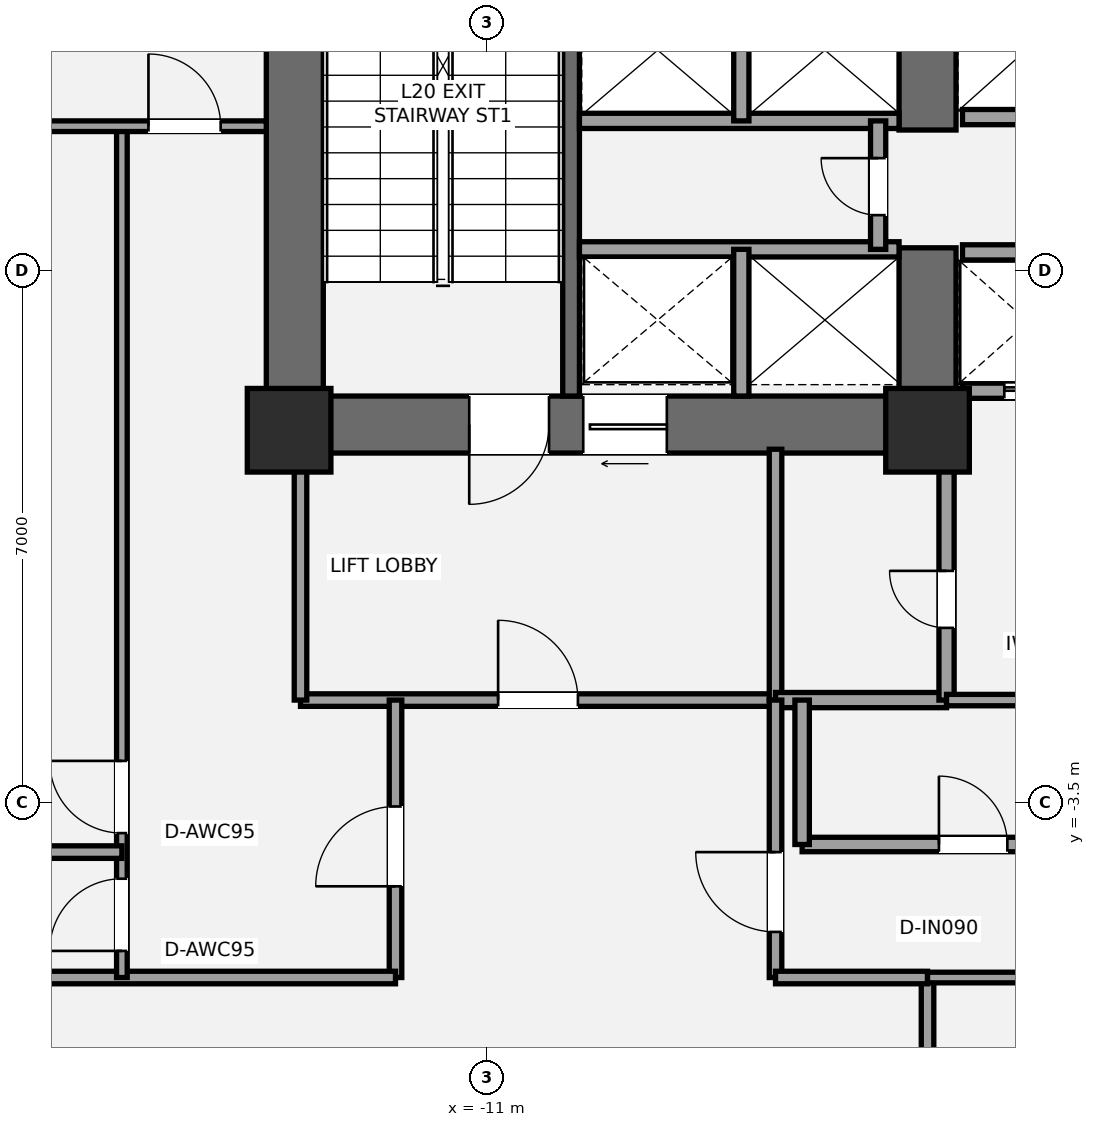
"""IFC4 building model, lengths in metres.
Left out: names, types, materials, properties, quantities, classifications, styles, units other than length and angle.
Written with IfcOpenShell. Run it as: python <this file> out.ifc"""

import sys

from ifc_helpers import new_model, si_unit, direction, frame, frame_2d, origin, origin_2d, place, context, subcontext, project, spatial, rectangle, extrude, element, fill, save


model = new_model("IFC4")
c1 = context("Model", 3, precision=1e-05, world=origin(), true_north=direction((0.0, 1.0)))
c2 = subcontext(c1, "Body", "Model", "MODEL_VIEW")
j1 = project(units=[si_unit("LENGTHUNIT", "METRE"), si_unit("PLANEANGLEUNIT", "RADIAN")], contexts=[c1])
p1 = place(None, origin())
s1 = spatial("IfcSite", under=j1, at=p1, CompositionType="ELEMENT")
p2 = place(p1, origin())
s2 = spatial("IfcBuilding", under=s1, at=p2, CompositionType="ELEMENT")
p3 = place(p2, frame((0.0, 0.0, 77.4)))
s3 = spatial("IfcBuildingStorey", under=s2, at=p3, CompositionType="ELEMENT", Elevation=77.4)
p4 = place(p3, frame((-13.525, 1.1, 0.0), z_axis=(0.0, 0.0, 1.0), x_axis=(0.0, 1.0, 0.0)))
e1 = element("IfcWall", 1, at=p4, inside=s3, PredefinedType="SHEAR", context=c2, shape_type="SweptSolid", body=[
    extrude(rectangle(XDim=8.65, YDim=0.75, at=frame_2d((4.325, 0.0))), origin(), (0.0, 0.0, 1.0), 4.5),
])
p5 = place(p3, frame((-4.825, 1.475, 0.0), z_axis=(0.0, 0.0, 1.0), x_axis=(-1.0, 0.0, 0.0)))
e2 = element("IfcWall", 2, at=p5, inside=s3, PredefinedType="SHEAR", context=c2, shape_type="SweptSolid", body=[
    extrude(rectangle(XDim=9.075, YDim=0.75, at=frame_2d((4.538, 0.0))), origin(), (0.0, 0.0, 1.0), 4.5),
])
p6 = place(p5, frame((5.355, 0.0, 0.0)))
e3 = element("IfcOpeningElement", 3, at=p6, cuts=e2, PredefinedType="OPENING", context=c2, shape_type="SweptSolid", body=[
    extrude(rectangle(XDim=1.05, YDim=2.15, at=frame_2d((0.525, 1.075))), frame((0.0, 0.385, 0.0), z_axis=(0.0, -1.0, 0.0), x_axis=(1.0, 0.0, 0.0)), (0.0, 0.0, 1.0), 0.77),
])
p7 = place(p5, frame((3.805, 0.0, 0.0)))
e4 = element("IfcOpeningElement", 4, at=p7, cuts=e2, PredefinedType="OPENING", context=c2, shape_type="SweptSolid", body=[
    extrude(rectangle(XDim=1.1, YDim=2.2, at=frame_2d((0.55, 1.1))), frame((0.0, 0.385, 0.0), z_axis=(0.0, -1.0, 0.0), x_axis=(1.0, 0.0, 0.0)), (0.0, 0.0, 1.0), 0.77),
])
p8 = place(p3, frame((-5.2, 1.1, 0.0), z_axis=(0.0, 0.0, 1.0), x_axis=(0.0, 1.0, 0.0)))
e5 = element("IfcWall", 5, at=p8, inside=s3, PredefinedType="SHEAR", context=c2, shape_type="SweptSolid", body=[
    extrude(rectangle(XDim=2.7, YDim=0.75, at=frame_2d((1.35, 0.0))), origin(), (0.0, 0.0, 1.0), 4.5),
])
p9 = place(p3, frame((-5.2, 5.35, 0.0), z_axis=(0.0, 0.0, 1.0), x_axis=(0.0, 1.0, 0.0)))
e6 = element("IfcWall", 6, at=p9, inside=s3, PredefinedType="SHEAR", context=c2, shape_type="SweptSolid", body=[
    extrude(rectangle(XDim=2.0, YDim=0.75, at=frame_2d((1.0, 0.0))), origin(), (0.0, 0.0, 1.0), 4.5),
])
p10 = place(p3, frame((-9.89, 1.85, 0.0), z_axis=(0.0, 0.0, 1.0), x_axis=(0.0, 1.0, 0.0)))
e7 = element("IfcWall", 7, at=p10, inside=s3, PredefinedType="SHEAR", context=c2, shape_type="SweptSolid", body=[
    extrude(rectangle(XDim=7.15, YDim=0.22, at=frame_2d((3.575, 0.0))), origin(), (0.0, 0.0, 1.0), 4.5),
])
for number, where, z_axis, x_axis in (
    (8, (-13.6, 1.4, 0.0), (0.0, 0.0, 1.0), (1.0, 0.0, 0.0)),
    (9, (-5.2, 1.4, 0.0), (0.0, 0.0, 1.0), (1.0, 0.0, 0.0)),
):
    element("IfcColumn", number, at=place(p3, frame(where, z_axis=z_axis, x_axis=x_axis)), inside=s3, PredefinedType="COLUMN", context=c2, shape_type="SweptSolid", body=[
        extrude(rectangle(XDim=1.1, YDim=1.1, at=origin_2d()), origin(), (0.0, 0.0, 1.0), 4.5),
    ])
p11 = place(p3, frame((-13.45, -2.15, 0.0), z_axis=(0.0, 0.0, 1.0), x_axis=(1.0, 0.0, 0.0)))
e10 = element("IfcWall", 10, at=p11, inside=s3, PredefinedType="PARTITIONING", context=c2, shape_type="SweptSolid", body=[
    extrude(rectangle(XDim=6.25, YDim=0.165, at=frame_2d((3.125, 0.0))), origin(), (0.0, 0.0, 1.0), 3.733),
])
p12 = place(p11, frame((2.6, 0.0, 0.0)))
e11 = element("IfcOpeningElement", 11, at=p12, cuts=e10, PredefinedType="OPENING", context=c2, shape_type="SweptSolid", body=[
    extrude(rectangle(XDim=1.05, YDim=2.15, at=frame_2d((0.525, 1.075))), frame((0.0, 0.093, 0.0), z_axis=(0.0, -1.0, 0.0), x_axis=(1.0, 0.0, 0.0)), (0.0, 0.0, 1.0), 0.185),
])
p13 = place(p3, frame((-13.45, -2.15, 0.0), z_axis=(0.0, 0.0, 1.0), x_axis=(0.0, 1.0, 0.0)))
e12 = element("IfcWall", 12, at=p13, inside=s3, PredefinedType="PARTITIONING", context=c2, shape_type="SweptSolid", body=[
    extrude(rectangle(XDim=3.3, YDim=0.165, at=frame_2d((1.65, 0.0))), origin(), (0.0, 0.0, 1.0), 2.47),
])
p14 = place(p3, frame((-7.2, -2.15, 0.0), z_axis=(0.0, 0.0, 1.0), x_axis=(0.0, 1.0, 0.0)))
e13 = element("IfcWall", 13, at=p14, inside=s3, PredefinedType="PARTITIONING", context=c2, shape_type="SweptSolid", body=[
    extrude(rectangle(XDim=3.3, YDim=0.165, at=frame_2d((1.65, 0.0))), origin(), (0.0, 0.0, 1.0), 3.733),
])
p15 = place(p3, frame((-7.2, -2.15, 0.0), z_axis=(0.0, 0.0, 1.0), x_axis=(1.0, 0.0, 0.0)))
e14 = element("IfcWall", 14, at=p15, inside=s3, PredefinedType="SOLIDWALL", context=c2, shape_type="SweptSolid", body=[
    extrude(rectangle(XDim=2.25, YDim=0.2, at=frame_2d((1.125, 0.0))), origin(), (0.0, 0.0, 1.0), 2.47),
])
p16 = place(p3, frame((-4.95, -2.15, 0.0), z_axis=(0.0, 0.0, 1.0), x_axis=(0.0, 1.0, 0.0)))
e15 = element("IfcWall", 15, at=p16, inside=s3, PredefinedType="SOLIDWALL", context=c2, shape_type="SweptSolid", body=[
    extrude(rectangle(XDim=3.3, YDim=0.2, at=frame_2d((1.65, 0.0))), origin(), (0.0, 0.0, 1.0), 2.47),
])
p17 = place(p16, frame((0.95, 0.0, 0.0)))
e16 = element("IfcOpeningElement", 16, at=p17, cuts=e15, PredefinedType="OPENING", context=c2, shape_type="SweptSolid", body=[
    extrude(rectangle(XDim=0.75, YDim=2.1, at=frame_2d((0.375, 1.05))), frame((0.0, 0.11, 0.0), z_axis=(0.0, -1.0, 0.0), x_axis=(1.0, 0.0, 0.0)), (0.0, 0.0, 1.0), 0.22),
])
p18 = place(p3, frame((-9.78, 3.78, 0.0), z_axis=(0.0, 0.0, 1.0), x_axis=(1.0, 0.0, 0.0)))
e17 = element("IfcWall", 17, at=p18, inside=s3, PredefinedType="SOLIDWALL", context=c2, shape_type="SweptSolid", body=[
    extrude(rectangle(XDim=4.205, YDim=0.2, at=frame_2d((2.103, 0.0))), origin(), (0.0, 0.0, 1.0), 4.28),
])
p19 = place(p3, frame((-7.65, 1.85, 0.0), z_axis=(0.0, 0.0, 1.0), x_axis=(0.0, 1.0, 0.0)))
e18 = element("IfcWall", 18, at=p19, inside=s3, PredefinedType="SOLIDWALL", context=c2, shape_type="SweptSolid", body=[
    extrude(rectangle(XDim=1.93, YDim=0.2, at=frame_2d((0.965, 0.0))), origin(), (0.0, 0.0, 1.0), 4.28),
])
p20 = place(p3, frame((-9.78, 5.47, 0.0), z_axis=(0.0, 0.0, 1.0), x_axis=(1.0, 0.0, 0.0)))
e19 = element("IfcWall", 19, at=p20, inside=s3, PredefinedType="SOLIDWALL", context=c2, shape_type="SweptSolid", body=[
    extrude(rectangle(XDim=4.205, YDim=0.2, at=frame_2d((2.103, 0.0))), origin(), (0.0, 0.0, 1.0), 4.28),
])
p21 = place(p3, frame((-7.65, 5.47, 0.0), z_axis=(0.0, 0.0, 1.0), x_axis=(0.0, 1.0, 0.0)))
e20 = element("IfcWall", 20, at=p21, inside=s3, PredefinedType="SOLIDWALL", context=c2, shape_type="SweptSolid", body=[
    extrude(rectangle(XDim=1.86, YDim=0.2, at=frame_2d((0.93, 0.0))), origin(), (0.0, 0.0, 1.0), 4.28),
])
p22 = place(p3, frame((-5.85, 3.78, 0.0), z_axis=(0.0, 0.0, 1.0), x_axis=(0.0, 1.0, 0.0)))
e21 = element("IfcWall", 21, at=p22, inside=s3, PredefinedType="SOLIDWALL", context=c2, shape_type="SweptSolid", body=[
    extrude(rectangle(XDim=1.69, YDim=0.2, at=frame_2d((0.845, 0.0))), origin(), (0.0, 0.0, 1.0), 4.28),
])
p23 = place(p22, frame((0.45, 0.0, 0.0)))
e22 = element("IfcOpeningElement", 22, at=p23, cuts=e21, PredefinedType="OPENING", context=c2, shape_type="SweptSolid", body=[
    extrude(rectangle(XDim=0.75, YDim=2.1, at=frame_2d((0.375, 1.05))), frame((0.0, 0.11, 0.0), z_axis=(0.0, -1.0, 0.0), x_axis=(1.0, 0.0, 0.0)), (0.0, 0.0, 1.0), 0.22),
])
p24 = place(p3, frame((-4.74, 1.92, 0.0), z_axis=(0.0, 0.0, 1.0), x_axis=(1.0, 0.0, 0.0)))
e23 = element("IfcWall", 23, at=p24, inside=s3, PredefinedType="SOLIDWALL", context=c2, shape_type="SweptSolid", body=[
    extrude(rectangle(XDim=3.86, YDim=0.2, at=frame_2d((1.93, 0.0))), origin(), (0.0, 0.0, 1.0), 3.27),
])
p25 = place(p24, frame((0.55, 0.0, 0.0)))
e24 = element("IfcOpeningElement", 24, at=p25, cuts=e23, PredefinedType="OPENING", context=c2, shape_type="SweptSolid", body=[
    extrude(rectangle(XDim=1.1, YDim=2.2, at=frame_2d((0.55, 1.1))), frame((0.0, 0.11, 0.0), z_axis=(0.0, -1.0, 0.0), x_axis=(1.0, 0.0, 0.0)), (0.0, 0.0, 1.0), 0.22),
])
p26 = place(p24, frame((2.55, 0.0, 0.0)))
e25 = element("IfcOpeningElement", 25, at=p26, cuts=e23, PredefinedType="OPENING", context=c2, shape_type="SweptSolid", body=[
    extrude(rectangle(XDim=1.1, YDim=2.2, at=frame_2d((0.55, 1.1))), frame((0.0, 0.11, 0.0), z_axis=(0.0, -1.0, 0.0), x_axis=(1.0, 0.0, 0.0)), (0.0, 0.0, 1.0), 0.22),
])
for number, where, z_axis, x_axis in (
    (26, (-4.74, 3.74, 0.0), (0.0, 0.0, 1.0), (1.0, 0.0, 0.0)),
    (27, (-4.74, 5.52, 0.0), (0.0, 0.0, 1.0), (1.0, 0.0, 0.0)),
):
    element("IfcWall", number, at=place(p3, frame(where, z_axis=z_axis, x_axis=x_axis)), inside=s3, PredefinedType="SOLIDWALL", context=c2, shape_type="SweptSolid", body=[
        extrude(rectangle(XDim=3.86, YDim=0.2, at=frame_2d((1.93, 0.0))), origin(), (0.0, 0.0, 1.0), 4.28),
    ])
p27 = place(p3, frame((-6.85, -4.05, 0.0), z_axis=(0.0, 0.0, 1.0), x_axis=(1.0, 0.0, 0.0)))
e28 = element("IfcWall", 28, at=p27, inside=s3, PredefinedType="PLUMBINGWALL", context=c2, shape_type="SweptSolid", body=[
    extrude(rectangle(XDim=4.75, YDim=0.19, at=frame_2d((2.375, 0.0))), origin(), (0.0, 0.0, 1.0), 2.47),
])
p28 = place(p27, frame((1.8, 0.0, 0.0)))
e29 = element("IfcOpeningElement", 29, at=p28, cuts=e28, PredefinedType="OPENING", context=c2, shape_type="SweptSolid", body=[
    extrude(rectangle(XDim=0.9, YDim=2.1, at=frame_2d((0.45, 1.05))), frame((0.0, 0.105, 0.0), z_axis=(0.0, -1.0, 0.0), x_axis=(1.0, 0.0, 0.0)), (0.0, 0.0, 1.0), 0.21),
])
p29 = place(p3, frame((-4.95, -2.15, 0.0), z_axis=(0.0, 0.0, 1.0), x_axis=(1.0, 0.0, 0.0)))
e30 = element("IfcWall", 30, at=p29, inside=s3, PredefinedType="PLUMBINGWALL", context=c2, shape_type="SweptSolid", body=[
    extrude(rectangle(XDim=2.85, YDim=0.15, at=frame_2d((1.425, 0.0))), origin(), (0.0, 0.0, 1.0), 4.28),
])
p30 = place(p3, frame((-6.85, -4.05, 0.0), z_axis=(0.0, 0.0, 1.0), x_axis=(0.0, 1.0, 0.0)))
e31 = element("IfcWall", 31, at=p30, inside=s3, PredefinedType="PLUMBINGWALL", context=c2, shape_type="SweptSolid", body=[
    extrude(rectangle(XDim=1.9, YDim=0.19, at=frame_2d((0.95, 0.0))), origin(), (0.0, 0.0, 1.0), 4.28),
])
p31 = place(p3, frame((-12.2, -5.8, 0.0), z_axis=(0.0, 0.0, 1.0), x_axis=(0.0, 1.0, 0.0)))
e32 = element("IfcWall", 32, at=p31, inside=s3, PredefinedType="PARTITIONING", context=c2, shape_type="SweptSolid", body=[
    extrude(rectangle(XDim=3.65, YDim=0.165, at=frame_2d((1.825, 0.0))), origin(), (0.0, 0.0, 1.0), 4.28),
])
p32 = place(p31, frame((1.2, 0.0, 0.0)))
e33 = element("IfcOpeningElement", 33, at=p32, cuts=e32, PredefinedType="OPENING", context=c2, shape_type="SweptSolid", body=[
    extrude(rectangle(XDim=1.05, YDim=2.15, at=frame_2d((0.525, 1.075))), frame((0.0, 0.093, 0.0), z_axis=(0.0, -1.0, 0.0), x_axis=(1.0, 0.0, 0.0)), (0.0, 0.0, 1.0), 0.185),
])
p33 = place(p3, frame((-7.2, -5.8, 0.0), z_axis=(0.0, 0.0, 1.0), x_axis=(0.0, 1.0, 0.0)))
e34 = element("IfcWall", 34, at=p33, inside=s3, PredefinedType="PARTITIONING", context=c2, shape_type="SweptSolid", body=[
    extrude(rectangle(XDim=3.65, YDim=0.165, at=frame_2d((1.825, 0.0))), origin(), (0.0, 0.0, 1.0), 4.28),
])
p34 = place(p33, frame((0.6, 0.0, 0.0)))
e35 = element("IfcOpeningElement", 35, at=p34, cuts=e34, PredefinedType="OPENING", context=c2, shape_type="SweptSolid", body=[
    extrude(rectangle(XDim=1.05, YDim=2.15, at=frame_2d((0.525, 1.075))), frame((0.0, 0.093, 0.0), z_axis=(0.0, -1.0, 0.0), x_axis=(1.0, 0.0, 0.0)), (0.0, 0.0, 1.0), 0.185),
])
p35 = place(p3, frame((-5.2, -18.634, 0.0), z_axis=(0.0, 0.0, 1.0), x_axis=(0.0, 1.0, 0.0)))
e36 = element("IfcWall", 36, at=p35, inside=s3, PredefinedType="PARTITIONING", context=c2, shape_type="SweptSolid", body=[
    extrude(rectangle(XDim=12.834, YDim=0.165, at=frame_2d((6.417, 0.0))), origin(), (0.0, 0.0, 1.0), 4.28),
])
p36 = place(p3, frame((-26.949, -5.8, 0.0), z_axis=(0.0, 0.0, 1.0), x_axis=(1.0, 0.0, 0.0)))
e37 = element("IfcWall", 37, at=p36, inside=s3, PredefinedType="PARTITIONING", context=c2, shape_type="SweptSolid", body=[
    extrude(rectangle(XDim=14.75, YDim=0.165, at=frame_2d((7.375, 0.0))), origin(), (0.0, 0.0, 1.0), 2.47),
])
p37 = place(p3, frame((-7.2, -5.8, 0.0), z_axis=(0.0, 0.0, 1.0), x_axis=(1.0, 0.0, 0.0)))
e38 = element("IfcWall", 38, at=p37, inside=s3, PredefinedType="PARTITIONING", context=c2, shape_type="SweptSolid", body=[
    extrude(rectangle(XDim=2.0, YDim=0.165, at=frame_2d((1.0, 0.0))), origin(), (0.0, 0.0, 1.0), 2.47),
])
p38 = place(p3, frame((-5.2, -5.8, 0.0), z_axis=(0.0, 0.0, 1.0), x_axis=(1.0, 0.0, 0.0)))
e39 = element("IfcWall", 39, at=p38, inside=s3, PredefinedType="PARTITIONING", context=c2, shape_type="SweptSolid", body=[
    extrude(rectangle(XDim=10.4, YDim=0.14, at=frame_2d((5.2, 0.0))), origin(), (0.0, 0.0, 1.0), 4.28),
])
p39 = place(p38, frame((1.8, 0.0, 0.0)))
e40 = element("IfcOpeningElement", 40, at=p39, cuts=e39, PredefinedType="OPENING", context=c2, shape_type="SweptSolid", body=[
    extrude(rectangle(XDim=0.95, YDim=2.15, at=frame_2d((0.475, 1.075))), frame((0.0, 0.08, 0.0), z_axis=(0.0, -1.0, 0.0), x_axis=(1.0, 0.0, 0.0)), (0.0, 0.0, 1.0), 0.16),
])
p40 = place(p38, frame((7.0, 0.0, 0.0)))
e41 = element("IfcOpeningElement", 41, at=p40, cuts=e39, PredefinedType="OPENING", context=c2, shape_type="SweptSolid", body=[
    extrude(rectangle(XDim=0.95, YDim=2.15, at=frame_2d((0.475, 1.075))), frame((0.0, 0.08, 0.0), z_axis=(0.0, -1.0, 0.0), x_axis=(1.0, 0.0, 0.0)), (0.0, 0.0, 1.0), 0.16),
])
p41 = place(p3, frame((-15.8, -5.8, 0.0), z_axis=(0.0, 0.0, 1.0), x_axis=(0.0, 1.0, 0.0)))
e42 = element("IfcWall", 42, at=p41, inside=s3, PredefinedType="PARTITIONING", context=c2, shape_type="SweptSolid", body=[
    extrude(rectangle(XDim=11.2, YDim=0.14, at=frame_2d((5.6, 0.0))), origin(), (0.0, 0.0, 1.0), 2.47),
])
p42 = place(p41, frame((0.35, 0.0, 0.0)))
e43 = element("IfcOpeningElement", 43, at=p42, cuts=e42, PredefinedType="OPENING", context=c2, shape_type="SweptSolid", body=[
    extrude(rectangle(XDim=0.95, YDim=2.15, at=frame_2d((0.475, 1.075))), frame((0.0, 0.08, 0.0), z_axis=(0.0, -1.0, 0.0), x_axis=(1.0, 0.0, 0.0)), (0.0, 0.0, 1.0), 0.16),
])
p43 = place(p41, frame((1.9, 0.0, 0.0)))
e44 = element("IfcOpeningElement", 44, at=p43, cuts=e42, PredefinedType="OPENING", context=c2, shape_type="SweptSolid", body=[
    extrude(rectangle(XDim=0.95, YDim=2.15, at=frame_2d((0.475, 1.075))), frame((0.0, 0.08, 0.0), z_axis=(0.0, -1.0, 0.0), x_axis=(1.0, 0.0, 0.0)), (0.0, 0.0, 1.0), 0.16),
])
p44 = place(p3, frame((-27.169, 5.4, 0.0), z_axis=(0.0, 0.0, 1.0), x_axis=(1.0, 0.0, 0.0)))
e45 = element("IfcWall", 45, at=p44, inside=s3, PredefinedType="PARTITIONING", context=c2, shape_type="SweptSolid", body=[
    extrude(rectangle(XDim=13.27, YDim=0.14, at=frame_2d((6.635, 0.0))), origin(), (0.0, 0.0, 1.0), 4.28),
])
p45 = place(p44, frame((11.719, 0.0, 0.0)))
e46 = element("IfcOpeningElement", 46, at=p45, cuts=e45, PredefinedType="OPENING", context=c2, shape_type="SweptSolid", body=[
    extrude(rectangle(XDim=0.95, YDim=2.15, at=frame_2d((0.475, 1.075))), frame((0.0, 0.08, 0.0), z_axis=(0.0, -1.0, 0.0), x_axis=(1.0, 0.0, 0.0)), (0.0, 0.0, 1.0), 0.16),
])
p46 = place(p3, frame((-27.537, -4.15, 0.0), z_axis=(0.0, 0.0, 1.0), x_axis=(1.0, 0.0, 0.0)))
e47 = element("IfcWall", 47, at=p46, inside=s3, PredefinedType="PARTITIONING", context=c2, shape_type="SweptSolid", body=[
    extrude(rectangle(XDim=11.737, YDim=0.165, at=frame_2d((5.868, 0.0))), origin(), (0.0, 0.0, 1.0), 2.47),
])
p47 = place(p6, origin())
e48 = element("IfcDoor", 48, at=p47, inside=s3, OperationType="SINGLE_SWING_RIGHT", PredefinedType="DOOR", context=c2, shape_type="SweptSolid", body=[
    extrude(rectangle(XDim=1.05, YDim=2.15, at=frame_2d((0.525, 1.075))), frame((0.0, 0.025, 0.0), z_axis=(0.0, -1.0, 0.0), x_axis=(1.0, 0.0, 0.0)), (0.0, 0.0, 1.0), 0.05),
])
fill(e3, e48)
p48 = place(p17, origin())
e49 = element("IfcDoor", 49, at=p48, inside=s3, OperationType="SINGLE_SWING_RIGHT", PredefinedType="DOOR", context=c2, shape_type="SweptSolid", body=[
    extrude(rectangle(XDim=0.75, YDim=2.1, at=frame_2d((0.375, 1.05))), frame((0.0, 0.025, 0.0), z_axis=(0.0, -1.0, 0.0), x_axis=(1.0, 0.0, 0.0)), (0.0, 0.0, 1.0), 0.05),
])
fill(e16, e49)
p49 = place(p7, origin())
e50 = element("IfcDoor", 50, at=p49, inside=s3, OperationType="SLIDING_TO_LEFT", PredefinedType="DOOR", context=c2, shape_type="SweptSolid", body=[
    extrude(rectangle(XDim=1.1, YDim=2.2, at=frame_2d((0.55, 1.1))), frame((0.0, 0.025, 0.0), z_axis=(0.0, -1.0, 0.0), x_axis=(1.0, 0.0, 0.0)), (0.0, 0.0, 1.0), 0.05),
])
fill(e4, e50)
p50 = place(p23, origin())
e51 = element("IfcDoor", 51, at=p50, inside=s3, OperationType="SINGLE_SWING_RIGHT", PredefinedType="DOOR", context=c2, shape_type="SweptSolid", body=[
    extrude(rectangle(XDim=0.75, YDim=2.1, at=frame_2d((0.375, 1.05))), frame((0.0, 0.025, 0.0), z_axis=(0.0, -1.0, 0.0), x_axis=(1.0, 0.0, 0.0)), (0.0, 0.0, 1.0), 0.05),
])
fill(e22, e51)
p51 = place(p25, origin())
e52 = element("IfcDoor", 52, at=p51, inside=s3, OperationType="SLIDING_TO_LEFT", PredefinedType="DOOR", context=c2, shape_type="SweptSolid", body=[
    extrude(rectangle(XDim=1.1, YDim=2.2, at=frame_2d((0.55, 1.1))), frame((0.0, 0.025, 0.0), z_axis=(0.0, -1.0, 0.0), x_axis=(1.0, 0.0, 0.0)), (0.0, 0.0, 1.0), 0.05),
])
fill(e24, e52)
p52 = place(p28, origin())
e53 = element("IfcDoor", 53, at=p52, inside=s3, OperationType="SINGLE_SWING_LEFT", PredefinedType="DOOR", context=c2, shape_type="SweptSolid", body=[
    extrude(rectangle(XDim=0.9, YDim=2.1, at=frame_2d((0.45, 1.05))), frame((0.0, 0.025, 0.0), z_axis=(0.0, -1.0, 0.0), x_axis=(1.0, 0.0, 0.0)), (0.0, 0.0, 1.0), 0.05),
])
fill(e29, e53)
p53 = place(p12, origin())
e54 = element("IfcDoor", 54, at=p53, inside=s3, OperationType="SINGLE_SWING_LEFT", PredefinedType="DOOR", context=c2, shape_type="SweptSolid", body=[
    extrude(rectangle(XDim=1.05, YDim=2.15, at=frame_2d((0.525, 1.075))), frame((0.0, 0.025, 0.0), z_axis=(0.0, -1.0, 0.0), x_axis=(1.0, 0.0, 0.0)), (0.0, 0.0, 1.0), 0.05),
])
fill(e11, e54)
p54 = place(p32, origin())
e55 = element("IfcDoor", 55, at=p54, inside=s3, OperationType="SINGLE_SWING_LEFT", PredefinedType="DOOR", context=c2, shape_type="SweptSolid", body=[
    extrude(rectangle(XDim=1.05, YDim=2.15, at=frame_2d((0.525, 1.075))), frame((0.0, 0.025, 0.0), z_axis=(0.0, -1.0, 0.0), x_axis=(1.0, 0.0, 0.0)), (0.0, 0.0, 1.0), 0.05),
])
fill(e33, e55)
p55 = place(p34, origin())
e56 = element("IfcDoor", 56, at=p55, inside=s3, OperationType="SINGLE_SWING_RIGHT", PredefinedType="DOOR", context=c2, shape_type="SweptSolid", body=[
    extrude(rectangle(XDim=1.05, YDim=2.15, at=frame_2d((0.525, 1.075))), frame((0.0, 0.025, 0.0), z_axis=(0.0, -1.0, 0.0), x_axis=(1.0, 0.0, 0.0)), (0.0, 0.0, 1.0), 0.05),
])
fill(e35, e56)
p56 = place(p42, origin())
e57 = element("IfcDoor", 57, at=p56, inside=s3, OperationType="SINGLE_SWING_LEFT", PredefinedType="DOOR", context=c2, shape_type="SweptSolid", body=[
    extrude(rectangle(XDim=0.95, YDim=2.15, at=frame_2d((0.475, 1.075))), frame((0.0, 0.025, 0.0), z_axis=(0.0, -1.0, 0.0), x_axis=(1.0, 0.0, 0.0)), (0.0, 0.0, 1.0), 0.05),
])
fill(e43, e57)
p57 = place(p43, origin())
e58 = element("IfcDoor", 58, at=p57, inside=s3, OperationType="SINGLE_SWING_RIGHT", PredefinedType="DOOR", context=c2, shape_type="SweptSolid", body=[
    extrude(rectangle(XDim=0.95, YDim=2.15, at=frame_2d((0.475, 1.075))), frame((0.0, 0.025, 0.0), z_axis=(0.0, -1.0, 0.0), x_axis=(1.0, 0.0, 0.0)), (0.0, 0.0, 1.0), 0.05),
])
fill(e44, e58)
p58 = place(p45, origin())
e59 = element("IfcDoor", 59, at=p58, inside=s3, OperationType="SINGLE_SWING_LEFT", PredefinedType="DOOR", context=c2, shape_type="SweptSolid", body=[
    extrude(rectangle(XDim=0.95, YDim=2.15, at=frame_2d((0.475, 1.075))), frame((0.0, 0.025, 0.0), z_axis=(0.0, -1.0, 0.0), x_axis=(1.0, 0.0, 0.0)), (0.0, 0.0, 1.0), 0.05),
])
fill(e46, e59)
save(model, sys.argv[1])
